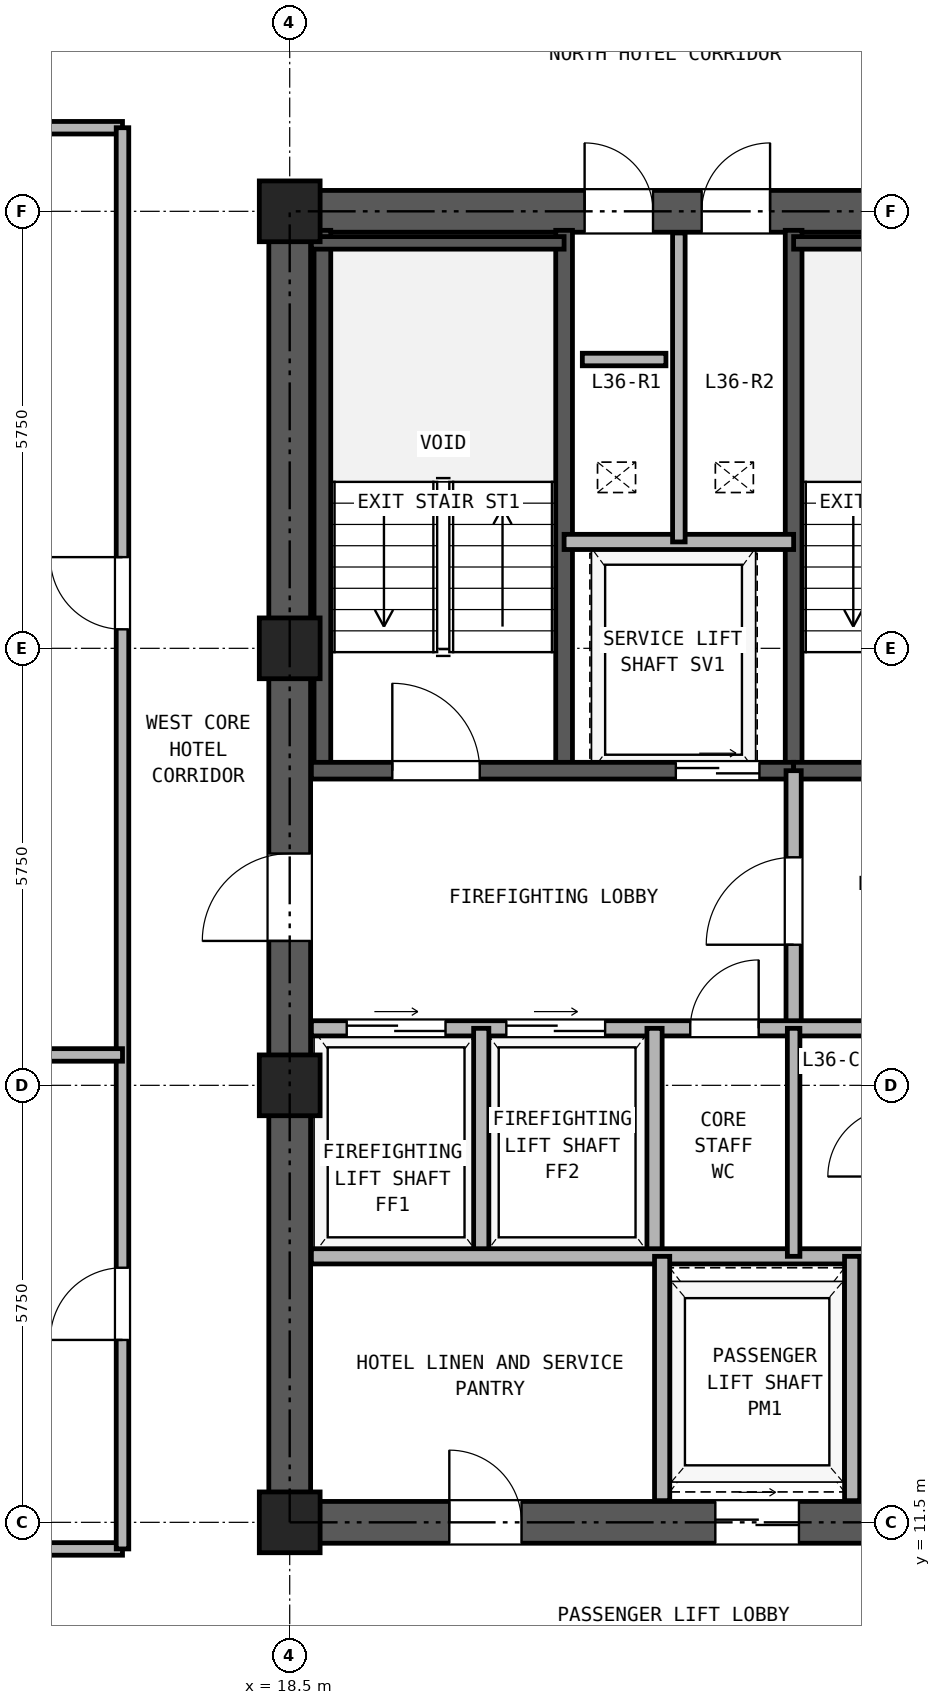
"""IFC4 building model, lengths in metres.
Left out: names, types, materials, properties, quantities, classifications, styles, units other than length and angle.
Written with IfcOpenShell. Run it as: python <this file> out.ifc"""

import sys

from ifc_helpers import new_model, si_unit, direction, frame, frame_2d, origin, origin_2d, place, context, subcontext, project, spatial, rectangle, hollow_rectangle, extrude, source, transform, mapped, element, fill, save


model = new_model("IFC4")
c1 = context("Model", 3, precision=1e-05, world=origin(), true_north=direction((0.0, 1.0)))
c2 = subcontext(c1, "Body", "Model", "MODEL_VIEW")
j1 = project(units=[si_unit("LENGTHUNIT", "METRE"), si_unit("PLANEANGLEUNIT", "RADIAN")], contexts=[c1])
p1 = place(None, origin())
s1 = spatial("IfcSite", under=j1, at=p1, CompositionType="ELEMENT")
p2 = place(p1, origin())
s2 = spatial("IfcBuilding", under=s1, at=p2, CompositionType="ELEMENT")
p3 = place(p2, frame((0.0, 0.0, 131.1)))
s3 = spatial("IfcBuildingStorey", under=s2, at=p3, CompositionType="ELEMENT", Elevation=131.1)
m1 = source(origin(), c2, "Body", "SweptSolid", [
    extrude(hollow_rectangle(XDim=0.8, YDim=0.8, WallThickness=0.045, at=origin_2d()), origin(), (0.0, 0.0, 1.0), 2.95),
])
for number, where, z_axis, x_axis in (
    (1, (18.5, 11.5, 0.0), (0.0, 0.0, 1.0), (1.0, 0.0, 0.0)),
    (2, (18.5, 17.25, 0.0), (0.0, 0.0, 1.0), (1.0, 0.0, 0.0)),
    (3, (18.5, 23.0, 0.0), (0.0, 0.0, 1.0), (1.0, 0.0, 0.0)),
    (4, (18.5, 28.75, 0.0), (0.0, 0.0, 1.0), (1.0, 0.0, 0.0)),
):
    element("IfcColumn", number, at=place(p3, frame(where, z_axis=z_axis, x_axis=x_axis)), inside=s3, PredefinedType="COLUMN", context=c2, shape_type="MappedRepresentation", body=[
        mapped(m1, transform((0.0, 0.0, 0.0), x_axis=(1.0, 0.0, 0.0), y_axis=(0.0, 1.0, 0.0), z_axis=(0.0, 0.0, 1.0), scale=1.0)),
    ])
p4 = place(p3, frame((18.225, 11.5, 0.0), z_axis=(0.0, 0.0, 1.0), x_axis=(1.0, 0.0, 0.0)))
e5 = element("IfcWall", 5, at=p4, inside=s3, PredefinedType="SHEAR", context=c2, shape_type="SweptSolid", body=[
    extrude(rectangle(XDim=10.55, YDim=0.55, at=frame_2d((5.275, 0.0))), origin(), (0.0, 0.0, 1.0), 2.95),
])
p5 = place(p4, frame((2.375, 0.0, 0.0)))
e6 = element("IfcOpeningElement", 6, at=p5, cuts=e5, PredefinedType="OPENING", context=c2, shape_type="SweptSolid", body=[
    extrude(rectangle(XDim=0.95, YDim=2.15, at=frame_2d((0.475, 1.075))), frame((0.0, 0.285, 0.0), z_axis=(0.0, -1.0, 0.0), x_axis=(1.0, 0.0, 0.0)), (0.0, 0.0, 1.0), 0.57),
])
p6 = place(p4, frame((5.875, 0.0, 0.0)))
e7 = element("IfcOpeningElement", 7, at=p6, cuts=e5, PredefinedType="OPENING", context=c2, shape_type="SweptSolid", body=[
    extrude(rectangle(XDim=1.1, YDim=2.25, at=frame_2d((0.55, 1.125))), frame((0.0, 0.285, 0.0), z_axis=(0.0, -1.0, 0.0), x_axis=(1.0, 0.0, 0.0)), (0.0, 0.0, 1.0), 0.57),
])
p7 = place(p4, frame((8.275, 0.0, 0.0)))
e8 = element("IfcOpeningElement", 8, at=p7, cuts=e5, PredefinedType="OPENING", context=c2, shape_type="SweptSolid", body=[
    extrude(rectangle(XDim=1.1, YDim=2.25, at=frame_2d((0.55, 1.125))), frame((0.0, 0.285, 0.0), z_axis=(0.0, -1.0, 0.0), x_axis=(1.0, 0.0, 0.0)), (0.0, 0.0, 1.0), 0.57),
])
p8 = place(p3, frame((18.225, 28.75, 0.0), z_axis=(0.0, 0.0, 1.0), x_axis=(1.0, 0.0, 0.0)))
e9 = element("IfcWall", 9, at=p8, inside=s3, PredefinedType="SHEAR", context=c2, shape_type="SweptSolid", body=[
    extrude(rectangle(XDim=10.55, YDim=0.55, at=frame_2d((5.275, 0.0))), origin(), (0.0, 0.0, 1.0), 2.95),
])
p9 = place(p8, frame((4.155, 0.0, 0.0)))
e10 = element("IfcOpeningElement", 10, at=p9, cuts=e9, PredefinedType="OPENING", context=c2, shape_type="SweptSolid", body=[
    extrude(rectangle(XDim=0.9, YDim=2.05, at=frame_2d((0.45, 1.025))), frame((0.0, 0.285, 0.0), z_axis=(0.0, -1.0, 0.0), x_axis=(1.0, 0.0, 0.0)), (0.0, 0.0, 1.0), 0.57),
])
p10 = place(p8, frame((5.695, 0.0, 0.0)))
e11 = element("IfcOpeningElement", 11, at=p10, cuts=e9, PredefinedType="OPENING", context=c2, shape_type="SweptSolid", body=[
    extrude(rectangle(XDim=0.9, YDim=2.05, at=frame_2d((0.45, 1.025))), frame((0.0, 0.285, 0.0), z_axis=(0.0, -1.0, 0.0), x_axis=(1.0, 0.0, 0.0)), (0.0, 0.0, 1.0), 0.57),
])
p11 = place(p3, frame((18.5, 11.775, 0.0), z_axis=(0.0, 0.0, 1.0), x_axis=(0.0, 1.0, 0.0)))
e12 = element("IfcWall", 12, at=p11, inside=s3, PredefinedType="SHEAR", context=c2, shape_type="SweptSolid", body=[
    extrude(rectangle(XDim=16.7, YDim=0.55, at=frame_2d((8.35, 0.0))), origin(), (0.0, 0.0, 1.0), 2.95),
])
p12 = place(p11, frame((7.375, 0.0, 0.0)))
e13 = element("IfcOpeningElement", 13, at=p12, cuts=e12, PredefinedType="OPENING", context=c2, shape_type="SweptSolid", body=[
    extrude(rectangle(XDim=1.15, YDim=2.2, at=frame_2d((0.575, 1.1))), frame((0.0, 0.285, 0.0), z_axis=(0.0, -1.0, 0.0), x_axis=(1.0, 0.0, 0.0)), (0.0, 0.0, 1.0), 0.57),
])
for number, where, z_axis, x_axis in (
    (14, (18.93, 21.39, 0.0), (0.0, 0.0, 1.0), (0.0, 1.0, 0.0)),
    (15, (22.11, 21.39, 0.0), (0.0, 0.0, 1.0), (0.0, 1.0, 0.0)),
    (16, (25.13, 21.39, 0.0), (0.0, 0.0, 1.0), (0.0, 1.0, 0.0)),
):
    element("IfcWall", number, at=place(p3, frame(where, z_axis=z_axis, x_axis=x_axis)), inside=s3, PredefinedType="SOLIDWALL", context=c2, shape_type="SweptSolid", body=[
        extrude(rectangle(XDim=7.11, YDim=0.22, at=frame_2d((3.555, 0.0))), origin(), (0.0, 0.0, 1.0), 2.95),
    ])
p13 = place(p3, frame((18.785, 28.335, 0.0), z_axis=(0.0, 0.0, 1.0), x_axis=(1.0, 0.0, 0.0)))
e17 = element("IfcWall", 17, at=p13, inside=s3, PredefinedType="PARTITIONING", context=c2, shape_type="SweptSolid", body=[
    extrude(rectangle(XDim=3.325, YDim=0.165, at=frame_2d((1.663, 0.0))), origin(), (0.0, 0.0, 1.0), 2.95),
])
p14 = place(p3, frame((25.13, 28.335, 0.0), z_axis=(0.0, 0.0, 1.0), x_axis=(1.0, 0.0, 0.0)))
e18 = element("IfcWall", 18, at=p14, inside=s3, PredefinedType="PARTITIONING", context=c2, shape_type="SweptSolid", body=[
    extrude(rectangle(XDim=3.085, YDim=0.165, at=frame_2d((1.542, 0.0))), origin(), (0.0, 0.0, 1.0), 2.95),
])
p15 = place(p3, frame((18.785, 21.39, 0.0), z_axis=(0.0, 0.0, 1.0), x_axis=(1.0, 0.0, 0.0)))
e19 = element("IfcWall", 19, at=p15, inside=s3, PredefinedType="SOLIDWALL", context=c2, shape_type="SweptSolid", body=[
    extrude(rectangle(XDim=6.345, YDim=0.22, at=frame_2d((3.172, 0.0))), origin(), (0.0, 0.0, 1.0), 2.95),
])
p16 = place(p15, frame((1.065, 0.0, 0.0)))
e20 = element("IfcOpeningElement", 20, at=p16, cuts=e19, PredefinedType="OPENING", context=c2, shape_type="SweptSolid", body=[
    extrude(rectangle(XDim=1.15, YDim=2.2, at=frame_2d((0.575, 1.1))), frame((0.0, 0.12, 0.0), z_axis=(0.0, -1.0, 0.0), x_axis=(1.0, 0.0, 0.0)), (0.0, 0.0, 1.0), 0.24),
])
p17 = place(p15, frame((4.795, 0.0, 0.0)))
e21 = element("IfcOpeningElement", 21, at=p17, cuts=e19, PredefinedType="OPENING", context=c2, shape_type="SweptSolid", body=[
    extrude(rectangle(XDim=1.1, YDim=2.25, at=frame_2d((0.55, 1.125))), frame((0.0, 0.12, 0.0), z_axis=(0.0, -1.0, 0.0), x_axis=(1.0, 0.0, 0.0)), (0.0, 0.0, 1.0), 0.24),
])
p18 = place(p3, frame((25.13, 21.39, 0.0), z_axis=(0.0, 0.0, 1.0), x_axis=(1.0, 0.0, 0.0)))
e22 = element("IfcWall", 22, at=p18, inside=s3, PredefinedType="SOLIDWALL", context=c2, shape_type="SweptSolid", body=[
    extrude(rectangle(XDim=3.085, YDim=0.22, at=frame_2d((1.542, 0.0))), origin(), (0.0, 0.0, 1.0), 2.95),
])
p19 = place(p18, frame((0.92, 0.0, 0.0)))
e23 = element("IfcOpeningElement", 23, at=p19, cuts=e22, PredefinedType="OPENING", context=c2, shape_type="SweptSolid", body=[
    extrude(rectangle(XDim=1.15, YDim=2.2, at=frame_2d((0.575, 1.1))), frame((0.0, 0.12, 0.0), z_axis=(0.0, -1.0, 0.0), x_axis=(1.0, 0.0, 0.0)), (0.0, 0.0, 1.0), 0.24),
])
p20 = place(p3, frame((22.11, 24.4, 0.0), z_axis=(0.0, 0.0, 1.0), x_axis=(1.0, 0.0, 0.0)))
e24 = element("IfcWall", 24, at=p20, inside=s3, PredefinedType="PARTITIONING", context=c2, shape_type="SweptSolid", body=[
    extrude(rectangle(XDim=3.02, YDim=0.2, at=frame_2d((1.51, 0.0))), origin(), (0.0, 0.0, 1.0), 2.95),
])
p21 = place(p3, frame((23.62, 24.4, 0.0), z_axis=(0.0, 0.0, 1.0), x_axis=(0.0, 1.0, 0.0)))
e25 = element("IfcWall", 25, at=p21, inside=s3, PredefinedType="PARTITIONING", context=c2, shape_type="SweptSolid", body=[
    extrude(rectangle(XDim=4.065, YDim=0.165, at=frame_2d((2.033, 0.0))), origin(), (0.0, 0.0, 1.0), 2.95),
])
p22 = place(p3, frame((25.13, 18.0, 0.0), z_axis=(0.0, 0.0, 1.0), x_axis=(0.0, 1.0, 0.0)))
e26 = element("IfcWall", 26, at=p22, inside=s3, PredefinedType="PARTITIONING", context=c2, shape_type="SweptSolid", body=[
    extrude(rectangle(XDim=3.39, YDim=0.2, at=frame_2d((1.695, 0.0))), origin(), (0.0, 0.0, 1.0), 2.95),
])
p23 = place(p22, frame((1.1, 0.0, 0.0)))
e27 = element("IfcOpeningElement", 27, at=p23, cuts=e26, PredefinedType="OPENING", context=c2, shape_type="SweptSolid", body=[
    extrude(rectangle(XDim=1.15, YDim=2.2, at=frame_2d((0.575, 1.1))), frame((0.0, 0.11, 0.0), z_axis=(0.0, -1.0, 0.0), x_axis=(1.0, 0.0, 0.0)), (0.0, 0.0, 1.0), 0.22),
])
p24 = place(p3, frame((18.785, 18.0, 0.0), z_axis=(0.0, 0.0, 1.0), x_axis=(1.0, 0.0, 0.0)))
e28 = element("IfcWall", 28, at=p24, inside=s3, PredefinedType="PARTITIONING", context=c2, shape_type="SweptSolid", body=[
    extrude(rectangle(XDim=9.43, YDim=0.2, at=frame_2d((4.715, 0.0))), origin(), (0.0, 0.0, 1.0), 2.95),
])
p25 = place(p24, frame((0.465, 0.0, 0.0)))
e29 = element("IfcOpeningElement", 29, at=p25, cuts=e28, PredefinedType="OPENING", context=c2, shape_type="SweptSolid", body=[
    extrude(rectangle(XDim=1.3, YDim=2.3, at=frame_2d((0.65, 1.15))), frame((0.0, 0.11, 0.0), z_axis=(0.0, -1.0, 0.0), x_axis=(1.0, 0.0, 0.0)), (0.0, 0.0, 1.0), 0.22),
])
p26 = place(p24, frame((2.565, 0.0, 0.0)))
e30 = element("IfcOpeningElement", 30, at=p26, cuts=e28, PredefinedType="OPENING", context=c2, shape_type="SweptSolid", body=[
    extrude(rectangle(XDim=1.3, YDim=2.3, at=frame_2d((0.65, 1.15))), frame((0.0, 0.11, 0.0), z_axis=(0.0, -1.0, 0.0), x_axis=(1.0, 0.0, 0.0)), (0.0, 0.0, 1.0), 0.22),
])
p27 = place(p24, frame((4.985, 0.0, 0.0)))
e31 = element("IfcOpeningElement", 31, at=p27, cuts=e28, PredefinedType="OPENING", context=c2, shape_type="SweptSolid", body=[
    extrude(rectangle(XDim=0.9, YDim=2.05, at=frame_2d((0.45, 1.025))), frame((0.0, 0.11, 0.0), z_axis=(0.0, -1.0, 0.0), x_axis=(1.0, 0.0, 0.0)), (0.0, 0.0, 1.0), 0.22),
])
p28 = place(p24, frame((8.115, 0.0, 0.0)))
e32 = element("IfcOpeningElement", 32, at=p28, cuts=e28, PredefinedType="OPENING", context=c2, shape_type="SweptSolid", body=[
    extrude(rectangle(XDim=0.9, YDim=2.05, at=frame_2d((0.45, 1.025))), frame((0.0, 0.11, 0.0), z_axis=(0.0, -1.0, 0.0), x_axis=(1.0, 0.0, 0.0)), (0.0, 0.0, 1.0), 0.22),
])
for number, where, z_axis, x_axis in (
    (33, (21.02, 15.0, 0.0), (0.0, 0.0, 1.0), (0.0, 1.0, 0.0)),
    (34, (23.3, 15.0, 0.0), (0.0, 0.0, 1.0), (0.0, 1.0, 0.0)),
):
    element("IfcWall", number, at=place(p3, frame(where, z_axis=z_axis, x_axis=x_axis)), inside=s3, PredefinedType="PARTITIONING", context=c2, shape_type="SweptSolid", body=[
        extrude(rectangle(XDim=3.0, YDim=0.2, at=frame_2d((1.5, 0.0))), origin(), (0.0, 0.0, 1.0), 2.95),
    ])
p29 = place(p3, frame((18.785, 15.0, 0.0), z_axis=(0.0, 0.0, 1.0), x_axis=(1.0, 0.0, 0.0)))
e35 = element("IfcWall", 35, at=p29, inside=s3, PredefinedType="PARTITIONING", context=c2, shape_type="SweptSolid", body=[
    extrude(rectangle(XDim=9.43, YDim=0.2, at=frame_2d((4.715, 0.0))), origin(), (0.0, 0.0, 1.0), 2.95),
])
p30 = place(p3, frame((25.13, 15.0, 0.0), z_axis=(0.0, 0.0, 1.0), x_axis=(0.0, 1.0, 0.0)))
e36 = element("IfcWall", 36, at=p30, inside=s3, PredefinedType="PARTITIONING", context=c2, shape_type="SweptSolid", body=[
    extrude(rectangle(XDim=3.0, YDim=0.165, at=frame_2d((1.5, 0.0))), origin(), (0.0, 0.0, 1.0), 2.95),
])
for number, where, z_axis, x_axis in (
    (37, (23.4, 11.785, 0.0), (0.0, 0.0, 1.0), (0.0, 1.0, 0.0)),
    (38, (25.9, 11.785, 0.0), (0.0, 0.0, 1.0), (0.0, 1.0, 0.0)),
):
    element("IfcWall", number, at=place(p3, frame(where, z_axis=z_axis, x_axis=x_axis)), inside=s3, PredefinedType="PARTITIONING", context=c2, shape_type="SweptSolid", body=[
        extrude(rectangle(XDim=3.215, YDim=0.2, at=frame_2d((1.607, 0.0))), origin(), (0.0, 0.0, 1.0), 2.95),
    ])
for number, where, z_axis, x_axis in (
    (39, (6.6, 11.15, 0.0), (0.0, 0.0, 1.0), (1.0, 0.0, 0.0)),
    (40, (6.6, 29.85, 0.0), (0.0, 0.0, 1.0), (1.0, 0.0, 0.0)),
):
    element("IfcWall", number, at=place(p3, frame(where, z_axis=z_axis, x_axis=x_axis)), inside=s3, PredefinedType="PARTITIONING", context=c2, shape_type="SweptSolid", body=[
        extrude(rectangle(XDim=9.7, YDim=0.165, at=frame_2d((4.85, 0.0))), origin(), (0.0, 0.0, 1.0), 2.95),
    ])
p31 = place(p3, frame((16.3, 11.15, 0.0), z_axis=(0.0, 0.0, 1.0), x_axis=(0.0, 1.0, 0.0)))
e41 = element("IfcWall", 41, at=p31, inside=s3, PredefinedType="PARTITIONING", context=c2, shape_type="SweptSolid", body=[
    extrude(rectangle(XDim=18.7, YDim=0.165, at=frame_2d((9.35, 0.0))), origin(), (0.0, 0.0, 1.0), 2.95),
])
p32 = place(p31, frame((2.75, 0.0, 0.0)))
e42 = element("IfcOpeningElement", 42, at=p32, cuts=e41, PredefinedType="OPENING", context=c2, shape_type="SweptSolid", body=[
    extrude(rectangle(XDim=0.95, YDim=2.15, at=frame_2d((0.475, 1.075))), frame((0.0, 0.093, 0.0), z_axis=(0.0, -1.0, 0.0), x_axis=(1.0, 0.0, 0.0)), (0.0, 0.0, 1.0), 0.185),
])
p33 = place(p31, frame((12.1, 0.0, 0.0)))
e43 = element("IfcOpeningElement", 43, at=p33, cuts=e41, PredefinedType="OPENING", context=c2, shape_type="SweptSolid", body=[
    extrude(rectangle(XDim=0.95, YDim=2.15, at=frame_2d((0.475, 1.075))), frame((0.0, 0.093, 0.0), z_axis=(0.0, -1.0, 0.0), x_axis=(1.0, 0.0, 0.0)), (0.0, 0.0, 1.0), 0.185),
])
p34 = place(p3, frame((0.16, 17.65, 0.0), z_axis=(0.0, 0.0, 1.0), x_axis=(1.0, 0.0, 0.0)))
e44 = element("IfcWall", 44, at=p34, inside=s3, PredefinedType="PARTITIONING", context=c2, shape_type="SweptSolid", body=[
    extrude(rectangle(XDim=16.14, YDim=0.165, at=frame_2d((8.07, 0.0))), origin(), (0.0, 0.0, 1.0), 2.95),
])
p35 = place(p3, frame((22.35, 26.8, 0.0), z_axis=(0.0, 0.0, 1.0), x_axis=(1.0, 0.0, 0.0)))
e45 = element("IfcWall", 45, at=p35, inside=s3, PredefinedType="PARTITIONING", context=c2, shape_type="SweptSolid", body=[
    extrude(rectangle(XDim=1.1, YDim=0.165, at=frame_2d((0.55, 0.0))), origin(), (0.0, 0.0, 1.0), 2.95),
])
p36 = place(p16, frame((1.15, 0.0, 0.0), z_axis=(0.0, 0.0, 1.0), x_axis=(-1.0, 0.0, 0.0)))
e46 = element("IfcDoor", 46, at=p36, inside=s3, OperationType="SINGLE_SWING_LEFT", PredefinedType="DOOR", context=c2, shape_type="SweptSolid", body=[
    extrude(rectangle(XDim=1.15, YDim=2.2, at=frame_2d((0.575, 1.1))), frame((0.0, 0.025, 0.0), z_axis=(0.0, -1.0, 0.0), x_axis=(1.0, 0.0, 0.0)), (0.0, 0.0, 1.0), 0.05),
])
fill(e20, e46)
p37 = place(p17, frame((1.1, 0.0, 0.0), z_axis=(0.0, 0.0, 1.0), x_axis=(-1.0, 0.0, 0.0)))
e47 = element("IfcDoor", 47, at=p37, inside=s3, OperationType="DOUBLE_DOOR_SLIDING", PredefinedType="DOOR", context=c2, shape_type="SweptSolid", body=[
    extrude(rectangle(XDim=1.1, YDim=2.25, at=frame_2d((0.55, 1.125))), frame((0.0, 0.025, 0.0), z_axis=(0.0, -1.0, 0.0), x_axis=(1.0, 0.0, 0.0)), (0.0, 0.0, 1.0), 0.05),
])
fill(e21, e47)
p38 = place(p23, origin())
e48 = element("IfcDoor", 48, at=p38, inside=s3, OperationType="SINGLE_SWING_LEFT", PredefinedType="DOOR", context=c2, shape_type="SweptSolid", body=[
    extrude(rectangle(XDim=1.15, YDim=2.2, at=frame_2d((0.575, 1.1))), frame((0.0, 0.025, 0.0), z_axis=(0.0, -1.0, 0.0), x_axis=(1.0, 0.0, 0.0)), (0.0, 0.0, 1.0), 0.05),
])
fill(e27, e48)
p39 = place(p25, origin())
e49 = element("IfcDoor", 49, at=p39, inside=s3, OperationType="DOUBLE_DOOR_SLIDING", PredefinedType="DOOR", context=c2, shape_type="SweptSolid", body=[
    extrude(rectangle(XDim=1.3, YDim=2.3, at=frame_2d((0.65, 1.15))), frame((0.0, 0.025, 0.0), z_axis=(0.0, -1.0, 0.0), x_axis=(1.0, 0.0, 0.0)), (0.0, 0.0, 1.0), 0.05),
])
fill(e29, e49)
p40 = place(p26, origin())
e50 = element("IfcDoor", 50, at=p40, inside=s3, OperationType="DOUBLE_DOOR_SLIDING", PredefinedType="DOOR", context=c2, shape_type="SweptSolid", body=[
    extrude(rectangle(XDim=1.3, YDim=2.3, at=frame_2d((0.65, 1.15))), frame((0.0, 0.025, 0.0), z_axis=(0.0, -1.0, 0.0), x_axis=(1.0, 0.0, 0.0)), (0.0, 0.0, 1.0), 0.05),
])
fill(e30, e50)
p41 = place(p27, frame((0.9, 0.0, 0.0), z_axis=(0.0, 0.0, 1.0), x_axis=(-1.0, 0.0, 0.0)))
e51 = element("IfcDoor", 51, at=p41, inside=s3, OperationType="SINGLE_SWING_RIGHT", PredefinedType="DOOR", context=c2, shape_type="SweptSolid", body=[
    extrude(rectangle(XDim=0.9, YDim=2.05, at=frame_2d((0.45, 1.025))), frame((0.0, 0.025, 0.0), z_axis=(0.0, -1.0, 0.0), x_axis=(1.0, 0.0, 0.0)), (0.0, 0.0, 1.0), 0.05),
])
fill(e31, e51)
p42 = place(p12, frame((1.15, 0.0, 0.0), z_axis=(0.0, 0.0, 1.0), x_axis=(-1.0, 0.0, 0.0)))
e52 = element("IfcDoor", 52, at=p42, inside=s3, OperationType="SINGLE_SWING_LEFT", PredefinedType="DOOR", context=c2, shape_type="SweptSolid", body=[
    extrude(rectangle(XDim=1.15, YDim=2.2, at=frame_2d((0.575, 1.1))), frame((0.0, 0.025, 0.0), z_axis=(0.0, -1.0, 0.0), x_axis=(1.0, 0.0, 0.0)), (0.0, 0.0, 1.0), 0.05),
])
fill(e13, e52)
p43 = place(p9, origin())
e53 = element("IfcDoor", 53, at=p43, inside=s3, OperationType="SINGLE_SWING_LEFT", PredefinedType="DOOR", context=c2, shape_type="SweptSolid", body=[
    extrude(rectangle(XDim=0.9, YDim=2.05, at=frame_2d((0.45, 1.025))), frame((0.0, 0.025, 0.0), z_axis=(0.0, -1.0, 0.0), x_axis=(1.0, 0.0, 0.0)), (0.0, 0.0, 1.0), 0.05),
])
fill(e10, e53)
p44 = place(p10, origin())
e54 = element("IfcDoor", 54, at=p44, inside=s3, OperationType="SINGLE_SWING_RIGHT", PredefinedType="DOOR", context=c2, shape_type="SweptSolid", body=[
    extrude(rectangle(XDim=0.9, YDim=2.05, at=frame_2d((0.45, 1.025))), frame((0.0, 0.025, 0.0), z_axis=(0.0, -1.0, 0.0), x_axis=(1.0, 0.0, 0.0)), (0.0, 0.0, 1.0), 0.05),
])
fill(e11, e54)
p45 = place(p5, frame((0.95, 0.0, 0.0), z_axis=(0.0, 0.0, 1.0), x_axis=(-1.0, 0.0, 0.0)))
e55 = element("IfcDoor", 55, at=p45, inside=s3, OperationType="SINGLE_SWING_LEFT", PredefinedType="DOOR", context=c2, shape_type="SweptSolid", body=[
    extrude(rectangle(XDim=0.95, YDim=2.15, at=frame_2d((0.475, 1.075))), frame((0.0, 0.025, 0.0), z_axis=(0.0, -1.0, 0.0), x_axis=(1.0, 0.0, 0.0)), (0.0, 0.0, 1.0), 0.05),
])
fill(e6, e55)
p46 = place(p6, frame((1.1, 0.0, 0.0), z_axis=(0.0, 0.0, 1.0), x_axis=(-1.0, 0.0, 0.0)))
e56 = element("IfcDoor", 56, at=p46, inside=s3, OperationType="DOUBLE_DOOR_SLIDING", PredefinedType="DOOR", context=c2, shape_type="SweptSolid", body=[
    extrude(rectangle(XDim=1.1, YDim=2.25, at=frame_2d((0.55, 1.125))), frame((0.0, 0.025, 0.0), z_axis=(0.0, -1.0, 0.0), x_axis=(1.0, 0.0, 0.0)), (0.0, 0.0, 1.0), 0.05),
])
fill(e7, e56)
p47 = place(p32, frame((0.95, 0.0, 0.0), z_axis=(0.0, 0.0, 1.0), x_axis=(-1.0, 0.0, 0.0)))
e57 = element("IfcDoor", 57, at=p47, inside=s3, OperationType="SINGLE_SWING_LEFT", PredefinedType="DOOR", context=c2, shape_type="SweptSolid", body=[
    extrude(rectangle(XDim=0.95, YDim=2.15, at=frame_2d((0.475, 1.075))), frame((0.0, 0.025, 0.0), z_axis=(0.0, -1.0, 0.0), x_axis=(1.0, 0.0, 0.0)), (0.0, 0.0, 1.0), 0.05),
])
fill(e42, e57)
p48 = place(p33, frame((0.95, 0.0, 0.0), z_axis=(0.0, 0.0, 1.0), x_axis=(-1.0, 0.0, 0.0)))
e58 = element("IfcDoor", 58, at=p48, inside=s3, OperationType="SINGLE_SWING_RIGHT", PredefinedType="DOOR", context=c2, shape_type="SweptSolid", body=[
    extrude(rectangle(XDim=0.95, YDim=2.15, at=frame_2d((0.475, 1.075))), frame((0.0, 0.025, 0.0), z_axis=(0.0, -1.0, 0.0), x_axis=(1.0, 0.0, 0.0)), (0.0, 0.0, 1.0), 0.05),
])
fill(e43, e58)
save(model, sys.argv[1])
